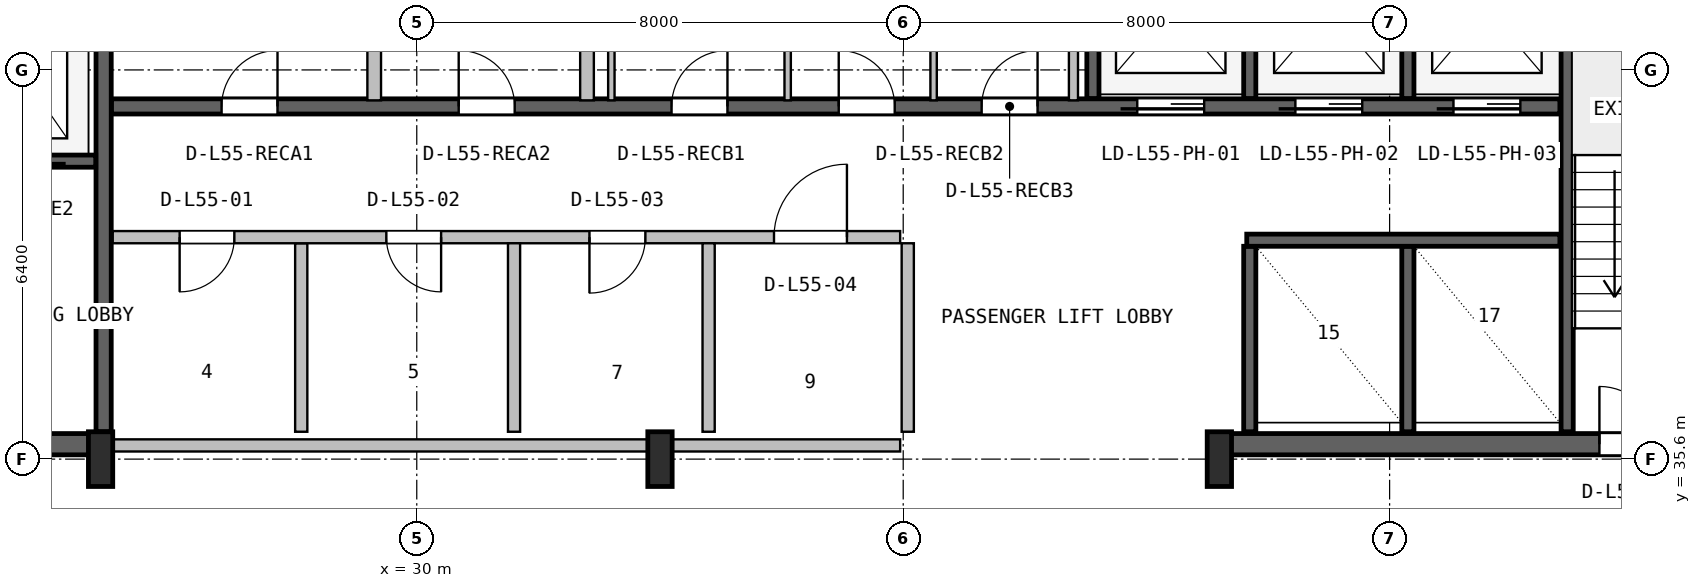
"""IFC4 building model, lengths in metres.
Left out: names, types, materials, properties, quantities, classifications, styles, units other than length and angle.
Written with IfcOpenShell. Run it as: python <this file> out.ifc"""

import sys

from ifc_helpers import new_model, si_unit, direction, frame, frame_2d, origin, origin_2d, place, context, subcontext, project, spatial, rectangle, i_section, extrude, source, transform, mapped, element, fill, save


model = new_model("IFC4")
c1 = context("Model", 3, precision=1e-05, world=origin(), true_north=direction((0.0, 1.0)))
c2 = subcontext(c1, "Body", "Model", "MODEL_VIEW")
j1 = project(units=[si_unit("LENGTHUNIT", "METRE"), si_unit("PLANEANGLEUNIT", "RADIAN")], contexts=[c1])
p1 = place(None, origin())
s1 = spatial("IfcSite", under=j1, at=p1, CompositionType="ELEMENT")
p2 = place(p1, origin())
s2 = spatial("IfcBuilding", under=s1, at=p2, CompositionType="ELEMENT")
p3 = place(p2, frame((0.0, 0.0, 222.6)))
s3 = spatial("IfcBuildingStorey", under=s2, at=p3, CompositionType="ELEMENT", Elevation=222.6)
p4 = place(p3, frame((15.67, 35.845, 0.0), z_axis=(0.0, 0.0, 1.0), x_axis=(1.0, 0.0, 0.0)))
e1 = element("IfcWall", 1, at=p4, inside=s3, PredefinedType="SHEAR", context=c2, shape_type="SweptSolid", body=[
    extrude(rectangle(XDim=9.13, YDim=0.35, at=frame_2d((4.565, 0.0))), origin(), (0.0, 0.0, 1.0), 3.55),
])
p5 = place(p4, frame((5.4, 0.0, 0.0)))
e2 = element("IfcOpeningElement", 2, at=p5, cuts=e1, PredefinedType="OPENING", context=c2, shape_type="SweptSolid", body=[
    extrude(rectangle(XDim=1.0, YDim=2.1, at=frame_2d((0.5, 1.05))), frame((0.0, 0.185, 0.0), z_axis=(0.0, -1.0, 0.0), x_axis=(1.0, 0.0, 0.0)), (0.0, 0.0, 1.0), 0.37),
])
p6 = place(p3, frame((43.2, 35.845, 0.0), z_axis=(0.0, 0.0, 1.0), x_axis=(1.0, 0.0, 0.0)))
e3 = element("IfcWall", 3, at=p6, inside=s3, PredefinedType="SHEAR", context=c2, shape_type="SweptSolid", body=[
    extrude(rectangle(XDim=9.13, YDim=0.35, at=frame_2d((4.565, 0.0))), origin(), (0.0, 0.0, 1.0), 3.55),
])
p7 = place(p6, frame((6.25, 0.0, 0.0)))
e4 = element("IfcOpeningElement", 4, at=p7, cuts=e3, PredefinedType="OPENING", context=c2, shape_type="SweptSolid", body=[
    extrude(rectangle(XDim=0.95, YDim=2.1, at=frame_2d((0.475, 1.05))), frame((0.0, 0.185, 0.0), z_axis=(0.0, -1.0, 0.0), x_axis=(1.0, 0.0, 0.0)), (0.0, 0.0, 1.0), 0.37),
])
m1 = source(origin(), c2, "Body", "SweptSolid", [
    extrude(i_section(OverallWidth=0.4, OverallDepth=0.9, WebThickness=0.016, FlangeThickness=0.028, FilletRadius=0.016, at=origin_2d()), origin(), (0.0, 0.0, 1.0), 3.8),
])
for number, where, z_axis, x_axis in (
    (5, (24.8, 35.6, 0.0), (0.0, 0.0, 1.0), (1.0, 0.0, 0.0)),
    (6, (34.0, 35.6, 0.0), (0.0, 0.0, 1.0), (1.0, 0.0, 0.0)),
    (7, (43.2, 35.6, 0.0), (0.0, 0.0, 1.0), (1.0, 0.0, 0.0)),
):
    element("IfcColumn", number, at=place(p3, frame(where, z_axis=z_axis, x_axis=x_axis)), inside=s3, PredefinedType="COLUMN", context=c2, shape_type="MappedRepresentation", body=[
        mapped(m1, transform((0.0, 0.0, 0.0), x_axis=(1.0, 0.0, 0.0), y_axis=(0.0, 1.0, 0.0), z_axis=(0.0, 0.0, 1.0), scale=1.0)),
    ])
p8 = place(p3, frame((24.85, 36.05, 0.0), z_axis=(0.0, 0.0, 1.0), x_axis=(0.0, 1.0, 0.0)))
e8 = element("IfcWall", 8, at=p8, inside=s3, PredefinedType="SHEAR", context=c2, shape_type="SweptSolid", body=[
    extrude(rectangle(XDim=10.45, YDim=0.25, at=frame_2d((5.225, 0.0))), origin(), (0.0, 0.0, 1.0), 3.55),
])
p9 = place(p3, frame((19.2, 40.5, 0.0), z_axis=(0.0, 0.0, 1.0), x_axis=(1.0, 0.0, 0.0)))
e9 = element("IfcWall", 9, at=p9, inside=s3, PredefinedType="SHEAR", context=c2, shape_type="SweptSolid", body=[
    extrude(rectangle(XDim=5.52, YDim=0.2, at=frame_2d((2.76, 0.0))), origin(), (0.0, 0.0, 1.0), 3.55),
])
p10 = place(p9, frame((1.05, 0.0, 0.0)))
e10 = element("IfcOpeningElement", 10, at=p10, cuts=e9, PredefinedType="OPENING", context=c2, shape_type="SweptSolid", body=[
    extrude(rectangle(XDim=1.1, YDim=2.18, at=frame_2d((0.55, 1.09))), frame((0.0, 0.11, 0.0), z_axis=(0.0, -1.0, 0.0), x_axis=(1.0, 0.0, 0.0)), (0.0, 0.0, 1.0), 0.22),
])
p11 = place(p9, frame((3.65, 0.0, 0.0)))
e11 = element("IfcOpeningElement", 11, at=p11, cuts=e9, PredefinedType="OPENING", context=c2, shape_type="SweptSolid", body=[
    extrude(rectangle(XDim=1.1, YDim=2.18, at=frame_2d((0.55, 1.09))), frame((0.0, 0.11, 0.0), z_axis=(0.0, -1.0, 0.0), x_axis=(1.0, 0.0, 0.0)), (0.0, 0.0, 1.0), 0.22),
])
p12 = place(p3, frame((48.92, 36.05, 0.0), z_axis=(0.0, 0.0, 1.0), x_axis=(0.0, 1.0, 0.0)))
e12 = element("IfcWall", 12, at=p12, inside=s3, PredefinedType="SHEAR", context=c2, shape_type="SweptSolid", body=[
    extrude(rectangle(XDim=10.5, YDim=0.2, at=frame_2d((5.25, 0.0))), origin(), (0.0, 0.0, 1.0), 3.55),
])
p13 = place(p3, frame((24.98, 41.4, 0.0), z_axis=(0.0, 0.0, 1.0), x_axis=(1.0, 0.0, 0.0)))
e13 = element("IfcWall", 13, at=p13, inside=s3, PredefinedType="SHEAR", context=c2, shape_type="SweptSolid", body=[
    extrude(rectangle(XDim=23.82, YDim=0.25, at=frame_2d((11.91, 0.0))), origin(), (0.0, 0.0, 1.0), 3.55),
])
p14 = place(p13, frame((16.87, 0.0, 0.0)))
e14 = element("IfcOpeningElement", 14, at=p14, cuts=e13, PredefinedType="OPENING", context=c2, shape_type="SweptSolid", body=[
    extrude(rectangle(XDim=1.1, YDim=2.18, at=frame_2d((0.55, 1.09))), frame((0.0, 0.135, 0.0), z_axis=(0.0, -1.0, 0.0), x_axis=(1.0, 0.0, 0.0)), (0.0, 0.0, 1.0), 0.27),
])
p15 = place(p13, frame((19.47, 0.0, 0.0)))
e15 = element("IfcOpeningElement", 15, at=p15, cuts=e13, PredefinedType="OPENING", context=c2, shape_type="SweptSolid", body=[
    extrude(rectangle(XDim=1.1, YDim=2.18, at=frame_2d((0.55, 1.09))), frame((0.0, 0.135, 0.0), z_axis=(0.0, -1.0, 0.0), x_axis=(1.0, 0.0, 0.0)), (0.0, 0.0, 1.0), 0.27),
])
p16 = place(p13, frame((22.07, 0.0, 0.0)))
e16 = element("IfcOpeningElement", 16, at=p16, cuts=e13, PredefinedType="OPENING", context=c2, shape_type="SweptSolid", body=[
    extrude(rectangle(XDim=1.1, YDim=2.18, at=frame_2d((0.55, 1.09))), frame((0.0, 0.135, 0.0), z_axis=(0.0, -1.0, 0.0), x_axis=(1.0, 0.0, 0.0)), (0.0, 0.0, 1.0), 0.27),
])
p17 = place(p13, frame((1.81, 0.0, 0.0)))
e17 = element("IfcOpeningElement", 17, at=p17, cuts=e13, PredefinedType="OPENING", context=c2, shape_type="SweptSolid", body=[
    extrude(rectangle(XDim=0.92, YDim=2.08, at=frame_2d((0.46, 1.04))), frame((0.0, 0.135, 0.0), z_axis=(0.0, -1.0, 0.0), x_axis=(1.0, 0.0, 0.0)), (0.0, 0.0, 1.0), 0.27),
])
p18 = place(p13, frame((5.71, 0.0, 0.0)))
e18 = element("IfcOpeningElement", 18, at=p18, cuts=e13, PredefinedType="OPENING", context=c2, shape_type="SweptSolid", body=[
    extrude(rectangle(XDim=0.92, YDim=2.08, at=frame_2d((0.46, 1.04))), frame((0.0, 0.135, 0.0), z_axis=(0.0, -1.0, 0.0), x_axis=(1.0, 0.0, 0.0)), (0.0, 0.0, 1.0), 0.27),
])
p19 = place(p13, frame((9.21, 0.0, 0.0)))
e19 = element("IfcOpeningElement", 19, at=p19, cuts=e13, PredefinedType="OPENING", context=c2, shape_type="SweptSolid", body=[
    extrude(rectangle(XDim=0.92, YDim=2.08, at=frame_2d((0.46, 1.04))), frame((0.0, 0.135, 0.0), z_axis=(0.0, -1.0, 0.0), x_axis=(1.0, 0.0, 0.0)), (0.0, 0.0, 1.0), 0.27),
])
p20 = place(p13, frame((11.96, 0.0, 0.0)))
e20 = element("IfcOpeningElement", 20, at=p20, cuts=e13, PredefinedType="OPENING", context=c2, shape_type="SweptSolid", body=[
    extrude(rectangle(XDim=0.92, YDim=2.08, at=frame_2d((0.46, 1.04))), frame((0.0, 0.135, 0.0), z_axis=(0.0, -1.0, 0.0), x_axis=(1.0, 0.0, 0.0)), (0.0, 0.0, 1.0), 0.27),
])
p21 = place(p13, frame((14.31, 0.0, 0.0)))
e21 = element("IfcOpeningElement", 21, at=p21, cuts=e13, PredefinedType="OPENING", context=c2, shape_type="SweptSolid", body=[
    extrude(rectangle(XDim=0.92, YDim=2.08, at=frame_2d((0.46, 1.04))), frame((0.0, 0.135, 0.0), z_axis=(0.0, -1.0, 0.0), x_axis=(1.0, 0.0, 0.0)), (0.0, 0.0, 1.0), 0.27),
])
p22 = place(p3, frame((41.12, 41.53, 0.0), z_axis=(0.0, 0.0, 1.0), x_axis=(0.0, 1.0, 0.0)))
e22 = element("IfcWall", 22, at=p22, inside=s3, PredefinedType="SHEAR", context=c2, shape_type="SweptSolid", body=[
    extrude(rectangle(XDim=5.02, YDim=0.2, at=frame_2d((2.51, 0.0))), origin(), (0.0, 0.0, 1.0), 3.55),
])
for number, where, z_axis, x_axis in (
    (23, (43.7, 41.53, 0.0), (0.0, 0.0, 1.0), (0.0, 1.0, 0.0)),
    (24, (46.3, 41.53, 0.0), (0.0, 0.0, 1.0), (0.0, 1.0, 0.0)),
):
    element("IfcWall", number, at=place(p3, frame(where, z_axis=z_axis, x_axis=x_axis)), inside=s3, PredefinedType="SHEAR", context=c2, shape_type="SweptSolid", body=[
        extrude(rectangle(XDim=2.87, YDim=0.2, at=frame_2d((1.435, 0.0))), origin(), (0.0, 0.0, 1.0), 3.55),
    ])
for number, where, z_axis, x_axis in (
    (25, (43.7, 36.05, 0.0), (0.0, 0.0, 1.0), (0.0, 1.0, 0.0)),
    (26, (46.3, 36.05, 0.0), (0.0, 0.0, 1.0), (0.0, 1.0, 0.0)),
):
    element("IfcWall", number, at=place(p3, frame(where, z_axis=z_axis, x_axis=x_axis)), inside=s3, PredefinedType="SHEAR", context=c2, shape_type="SweptSolid", body=[
        extrude(rectangle(XDim=3.05, YDim=0.2, at=frame_2d((1.525, 0.0))), origin(), (0.0, 0.0, 1.0), 3.55),
    ])
p23 = place(p3, frame((43.65, 39.2, 0.0), z_axis=(0.0, 0.0, 1.0), x_axis=(1.0, 0.0, 0.0)))
e27 = element("IfcWall", 27, at=p23, inside=s3, PredefinedType="SHEAR", context=c2, shape_type="SweptSolid", body=[
    extrude(rectangle(XDim=5.15, YDim=0.2, at=frame_2d((2.575, 0.0))), origin(), (0.0, 0.0, 1.0), 3.55),
])
p24 = place(p3, frame((25.0, 35.825, 0.0), z_axis=(0.0, 0.0, 1.0), x_axis=(1.0, 0.0, 0.0)))
e28 = element("IfcWall", 28, at=p24, inside=s3, PredefinedType="SOLIDWALL", context=c2, shape_type="SweptSolid", body=[
    extrude(rectangle(XDim=12.95, YDim=0.2, at=frame_2d((6.475, 0.0))), origin(), (0.0, 0.0, 1.0), 2.575),
])
p25 = place(p3, frame((28.1, 36.05, 0.0), z_axis=(0.0, 0.0, 1.0), x_axis=(0.0, 1.0, 0.0)))
e29 = element("IfcWall", 29, at=p25, inside=s3, PredefinedType="PLUMBINGWALL", context=c2, shape_type="SweptSolid", body=[
    extrude(rectangle(XDim=3.1, YDim=0.2, at=frame_2d((1.55, 0.0))), origin(), (0.0, 0.0, 1.0), 3.53),
])
p26 = place(p3, frame((25.0, 39.25, 0.0), z_axis=(0.0, 0.0, 1.0), x_axis=(1.0, 0.0, 0.0)))
e30 = element("IfcWall", 30, at=p26, inside=s3, PredefinedType="SOLIDWALL", context=c2, shape_type="SweptSolid", body=[
    extrude(rectangle(XDim=12.95, YDim=0.2, at=frame_2d((6.475, 0.0))), origin(), (0.0, 0.0, 1.0), 3.53),
])
p27 = place(p26, frame((1.1, 0.0, 0.0)))
e31 = element("IfcOpeningElement", 31, at=p27, cuts=e30, PredefinedType="OPENING", context=c2, shape_type="SweptSolid", body=[
    extrude(rectangle(XDim=0.9, YDim=2.06, at=frame_2d((0.45, 1.03))), frame((0.0, 0.11, 0.0), z_axis=(0.0, -1.0, 0.0), x_axis=(1.0, 0.0, 0.0)), (0.0, 0.0, 1.0), 0.22),
])
p28 = place(p26, frame((4.5, 0.0, 0.0)))
e32 = element("IfcOpeningElement", 32, at=p28, cuts=e30, PredefinedType="OPENING", context=c2, shape_type="SweptSolid", body=[
    extrude(rectangle(XDim=0.9, YDim=2.06, at=frame_2d((0.45, 1.03))), frame((0.0, 0.11, 0.0), z_axis=(0.0, -1.0, 0.0), x_axis=(1.0, 0.0, 0.0)), (0.0, 0.0, 1.0), 0.22),
])
p29 = place(p26, frame((7.84, 0.0, 0.0)))
e33 = element("IfcOpeningElement", 33, at=p29, cuts=e30, PredefinedType="OPENING", context=c2, shape_type="SweptSolid", body=[
    extrude(rectangle(XDim=0.92, YDim=2.08, at=frame_2d((0.46, 1.04))), frame((0.0, 0.11, 0.0), z_axis=(0.0, -1.0, 0.0), x_axis=(1.0, 0.0, 0.0)), (0.0, 0.0, 1.0), 0.22),
])
p30 = place(p26, frame((10.875, 0.0, 0.0)))
e34 = element("IfcOpeningElement", 34, at=p30, cuts=e30, PredefinedType="OPENING", context=c2, shape_type="SweptSolid", body=[
    extrude(rectangle(XDim=1.2, YDim=2.1, at=frame_2d((0.6, 1.05))), frame((0.0, 0.11, 0.0), z_axis=(0.0, -1.0, 0.0), x_axis=(1.0, 0.0, 0.0)), (0.0, 0.0, 1.0), 0.22),
])
p31 = place(p3, frame((31.6, 36.05, 0.0), z_axis=(0.0, 0.0, 1.0), x_axis=(0.0, 1.0, 0.0)))
e35 = element("IfcWall", 35, at=p31, inside=s3, PredefinedType="PLUMBINGWALL", context=c2, shape_type="SweptSolid", body=[
    extrude(rectangle(XDim=3.1, YDim=0.2, at=frame_2d((1.55, 0.0))), origin(), (0.0, 0.0, 1.0), 3.53),
])
for number, where, z_axis, x_axis in (
    (36, (34.8, 36.05, 0.0), (0.0, 0.0, 1.0), (0.0, 1.0, 0.0)),
    (37, (38.075, 36.05, 0.0), (0.0, 0.0, 1.0), (0.0, 1.0, 0.0)),
):
    element("IfcWall", number, at=place(p3, frame(where, z_axis=z_axis, x_axis=x_axis)), inside=s3, PredefinedType="SOLIDWALL", context=c2, shape_type="SweptSolid", body=[
        extrude(rectangle(XDim=3.1, YDim=0.2, at=frame_2d((1.55, 0.0))), origin(), (0.0, 0.0, 1.0), 3.53),
    ])
p32 = place(p3, frame((29.3, 41.5, 0.0), z_axis=(0.0, 0.0, 1.0), x_axis=(0.0, 1.0, 0.0)))
e38 = element("IfcWall", 38, at=p32, inside=s3, PredefinedType="PARTITIONING", context=c2, shape_type="SweptSolid", body=[
    extrude(rectangle(XDim=2.288, YDim=0.225, at=frame_2d((1.144, 0.0))), origin(), (0.0, 0.0, 1.0), 3.53),
])
p33 = place(p3, frame((32.8, 41.5, 0.0), z_axis=(0.0, 0.0, 1.0), x_axis=(0.0, 1.0, 0.0)))
e39 = element("IfcWall", 39, at=p33, inside=s3, PredefinedType="PARTITIONING", context=c2, shape_type="SweptSolid", body=[
    extrude(rectangle(XDim=5.02, YDim=0.225, at=frame_2d((2.51, 0.0))), origin(), (0.0, 0.0, 1.0), 3.53),
])
for number, where, z_axis, x_axis in (
    (40, (36.1, 41.5, 0.0), (0.0, 0.0, 1.0), (0.0, 1.0, 0.0)),
    (41, (33.2, 41.5, 0.0), (0.0, 0.0, 1.0), (0.0, 1.0, 0.0)),
    (42, (38.5, 41.5, 0.0), (0.0, 0.0, 1.0), (0.0, 1.0, 0.0)),
):
    element("IfcWall", number, at=place(p3, frame(where, z_axis=z_axis, x_axis=x_axis)), inside=s3, PredefinedType="PARTITIONING", context=c2, shape_type="SweptSolid", body=[
        extrude(rectangle(XDim=5.02, YDim=0.105, at=frame_2d((2.51, 0.0))), origin(), (0.0, 0.0, 1.0), 3.53),
    ])
p34 = place(p3, frame((40.8, 41.5, 0.0), z_axis=(0.0, 0.0, 1.0), x_axis=(0.0, 1.0, 0.0)))
e43 = element("IfcWall", 43, at=p34, inside=s3, PredefinedType="PARTITIONING", context=c2, shape_type="SweptSolid", body=[
    extrude(rectangle(XDim=5.02, YDim=0.15, at=frame_2d((2.51, 0.0))), origin(), (0.0, 0.0, 1.0), 3.53),
])
m2 = source(origin(), c2, "Body", "SweptSolid", [
    extrude(rectangle(XDim=0.95, YDim=2.1, at=frame_2d((0.475, 1.05))), frame((0.0, 0.025, 0.0), z_axis=(0.0, -1.0, 0.0), x_axis=(1.0, 0.0, 0.0)), (0.0, 0.0, 1.0), 0.05),
])
p35 = place(p7, origin())
e44 = element("IfcDoor", 44, at=p35, inside=s3, OperationType="SINGLE_SWING_LEFT", PredefinedType="DOOR", context=c2, shape_type="MappedRepresentation", body=[
    mapped(m2, transform((0.0, 0.0, 0.0), x_axis=(1.0, 0.0, 0.0), y_axis=(0.0, 1.0, 0.0), z_axis=(0.0, 0.0, 1.0), scale=1.0)),
])
fill(e4, e44)
m3 = source(origin(), c2, "Body", "SweptSolid", [
    extrude(rectangle(XDim=1.1, YDim=2.18, at=frame_2d((0.55, 1.09))), frame((0.0, 0.025, 0.0), z_axis=(0.0, -1.0, 0.0), x_axis=(1.0, 0.0, 0.0)), (0.0, 0.0, 1.0), 0.05),
])
p36 = place(p14, frame((1.1, 0.0, 0.0), z_axis=(0.0, 0.0, 1.0), x_axis=(-1.0, 0.0, 0.0)))
e45 = element("IfcDoor", 45, at=p36, inside=s3, OperationType="SLIDING_TO_LEFT", PredefinedType="DOOR", context=c2, shape_type="MappedRepresentation", body=[
    mapped(m3, transform((0.0, 0.0, 0.0), x_axis=(1.0, 0.0, 0.0), y_axis=(0.0, 1.0, 0.0), z_axis=(0.0, 0.0, 1.0), scale=1.0)),
])
fill(e14, e45)
p37 = place(p15, frame((1.1, 0.0, 0.0), z_axis=(0.0, 0.0, 1.0), x_axis=(-1.0, 0.0, 0.0)))
e46 = element("IfcDoor", 46, at=p37, inside=s3, OperationType="SLIDING_TO_LEFT", PredefinedType="DOOR", context=c2, shape_type="MappedRepresentation", body=[
    mapped(m3, transform((0.0, 0.0, 0.0), x_axis=(1.0, 0.0, 0.0), y_axis=(0.0, 1.0, 0.0), z_axis=(0.0, 0.0, 1.0), scale=1.0)),
])
fill(e15, e46)
p38 = place(p16, frame((1.1, 0.0, 0.0), z_axis=(0.0, 0.0, 1.0), x_axis=(-1.0, 0.0, 0.0)))
e47 = element("IfcDoor", 47, at=p38, inside=s3, OperationType="SLIDING_TO_LEFT", PredefinedType="DOOR", context=c2, shape_type="MappedRepresentation", body=[
    mapped(m3, transform((0.0, 0.0, 0.0), x_axis=(1.0, 0.0, 0.0), y_axis=(0.0, 1.0, 0.0), z_axis=(0.0, 0.0, 1.0), scale=1.0)),
])
fill(e16, e47)
m4 = source(origin(), c2, "Body", "SweptSolid", [
    extrude(rectangle(XDim=0.92, YDim=2.08, at=frame_2d((0.46, 1.04))), frame((0.0, 0.025, 0.0), z_axis=(0.0, -1.0, 0.0), x_axis=(1.0, 0.0, 0.0)), (0.0, 0.0, 1.0), 0.05),
])
p39 = place(p17, origin())
e48 = element("IfcDoor", 48, at=p39, inside=s3, OperationType="SINGLE_SWING_RIGHT", PredefinedType="DOOR", context=c2, shape_type="MappedRepresentation", body=[
    mapped(m4, transform((0.0, 0.0, 0.0), x_axis=(1.0, 0.0, 0.0), y_axis=(0.0, 1.0, 0.0), z_axis=(0.0, 0.0, 1.0), scale=1.0)),
])
fill(e17, e48)
p40 = place(p18, origin())
e49 = element("IfcDoor", 49, at=p40, inside=s3, OperationType="SINGLE_SWING_LEFT", PredefinedType="DOOR", context=c2, shape_type="MappedRepresentation", body=[
    mapped(m4, transform((0.0, 0.0, 0.0), x_axis=(1.0, 0.0, 0.0), y_axis=(0.0, 1.0, 0.0), z_axis=(0.0, 0.0, 1.0), scale=1.0)),
])
fill(e18, e49)
p41 = place(p19, origin())
e50 = element("IfcDoor", 50, at=p41, inside=s3, OperationType="SINGLE_SWING_RIGHT", PredefinedType="DOOR", context=c2, shape_type="MappedRepresentation", body=[
    mapped(m4, transform((0.0, 0.0, 0.0), x_axis=(1.0, 0.0, 0.0), y_axis=(0.0, 1.0, 0.0), z_axis=(0.0, 0.0, 1.0), scale=1.0)),
])
fill(e19, e50)
p42 = place(p20, origin())
e51 = element("IfcDoor", 51, at=p42, inside=s3, OperationType="SINGLE_SWING_LEFT", PredefinedType="DOOR", context=c2, shape_type="MappedRepresentation", body=[
    mapped(m4, transform((0.0, 0.0, 0.0), x_axis=(1.0, 0.0, 0.0), y_axis=(0.0, 1.0, 0.0), z_axis=(0.0, 0.0, 1.0), scale=1.0)),
])
fill(e20, e51)
p43 = place(p21, origin())
e52 = element("IfcDoor", 52, at=p43, inside=s3, OperationType="SINGLE_SWING_RIGHT", PredefinedType="DOOR", context=c2, shape_type="MappedRepresentation", body=[
    mapped(m4, transform((0.0, 0.0, 0.0), x_axis=(1.0, 0.0, 0.0), y_axis=(0.0, 1.0, 0.0), z_axis=(0.0, 0.0, 1.0), scale=1.0)),
])
fill(e21, e52)
m5 = source(origin(), c2, "Body", "SweptSolid", [
    extrude(rectangle(XDim=0.9, YDim=2.06, at=frame_2d((0.45, 1.03))), frame((0.0, 0.025, 0.0), z_axis=(0.0, -1.0, 0.0), x_axis=(1.0, 0.0, 0.0)), (0.0, 0.0, 1.0), 0.05),
])
p44 = place(p27, frame((0.9, 0.0, 0.0), z_axis=(0.0, 0.0, 1.0), x_axis=(-1.0, 0.0, 0.0)))
e53 = element("IfcDoor", 53, at=p44, inside=s3, OperationType="SINGLE_SWING_LEFT", PredefinedType="DOOR", context=c2, shape_type="MappedRepresentation", body=[
    mapped(m5, transform((0.0, 0.0, 0.0), x_axis=(1.0, 0.0, 0.0), y_axis=(0.0, 1.0, 0.0), z_axis=(0.0, 0.0, 1.0), scale=1.0)),
])
fill(e31, e53)
p45 = place(p28, frame((0.9, 0.0, 0.0), z_axis=(0.0, 0.0, 1.0), x_axis=(-1.0, 0.0, 0.0)))
e54 = element("IfcDoor", 54, at=p45, inside=s3, OperationType="SINGLE_SWING_RIGHT", PredefinedType="DOOR", context=c2, shape_type="MappedRepresentation", body=[
    mapped(m5, transform((0.0, 0.0, 0.0), x_axis=(1.0, 0.0, 0.0), y_axis=(0.0, 1.0, 0.0), z_axis=(0.0, 0.0, 1.0), scale=1.0)),
])
fill(e32, e54)
p46 = place(p29, frame((0.92, 0.0, 0.0), z_axis=(0.0, 0.0, 1.0), x_axis=(-1.0, 0.0, 0.0)))
e55 = element("IfcDoor", 55, at=p46, inside=s3, OperationType="SINGLE_SWING_LEFT", PredefinedType="DOOR", context=c2, shape_type="MappedRepresentation", body=[
    mapped(m4, transform((0.0, 0.0, 0.0), x_axis=(1.0, 0.0, 0.0), y_axis=(0.0, 1.0, 0.0), z_axis=(0.0, 0.0, 1.0), scale=1.0)),
])
fill(e33, e55)
m6 = source(origin(), c2, "Body", "SweptSolid", [
    extrude(rectangle(XDim=1.2, YDim=2.1, at=frame_2d((0.6, 1.05))), frame((0.0, 0.025, 0.0), z_axis=(0.0, -1.0, 0.0), x_axis=(1.0, 0.0, 0.0)), (0.0, 0.0, 1.0), 0.05),
])
p47 = place(p30, origin())
e56 = element("IfcDoor", 56, at=p47, inside=s3, OperationType="SINGLE_SWING_RIGHT", PredefinedType="DOOR", context=c2, shape_type="MappedRepresentation", body=[
    mapped(m6, transform((0.0, 0.0, 0.0), x_axis=(1.0, 0.0, 0.0), y_axis=(0.0, 1.0, 0.0), z_axis=(0.0, 0.0, 1.0), scale=1.0)),
])
fill(e34, e56)
save(model, sys.argv[1])
